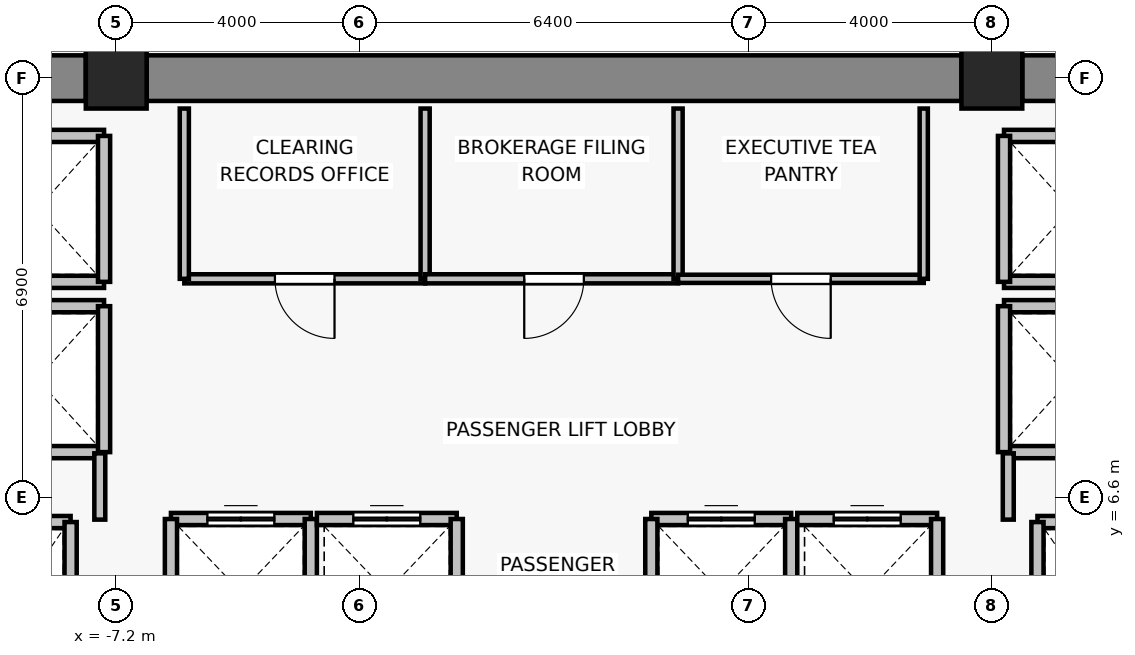
"""IFC4 building model, lengths in metres.
Left out: names, types, materials, properties, quantities, classifications, styles, units other than length and angle.
Written with IfcOpenShell. Run it as: python <this file> out.ifc"""

import sys

from ifc_helpers import new_model, si_unit, direction, frame, frame_2d, origin, origin_2d, place, context, subcontext, project, spatial, rectangle, extrude, source, transform, mapped, element, fill, save


model = new_model("IFC4")
c1 = context("Model", 3, precision=1e-05, world=origin(), true_north=direction((0.0, 1.0)))
c2 = subcontext(c1, "Body", "Model", "MODEL_VIEW")
j1 = project(units=[si_unit("LENGTHUNIT", "METRE"), si_unit("PLANEANGLEUNIT", "RADIAN")], contexts=[c1])
p1 = place(None, origin())
s1 = spatial("IfcSite", under=j1, at=p1, CompositionType="ELEMENT")
p2 = place(p1, origin())
s2 = spatial("IfcBuilding", under=s1, at=p2, CompositionType="ELEMENT")
p3 = place(p2, frame((0.0, 0.0, 116.5)))
s3 = spatial("IfcBuildingStorey", under=s2, at=p3, CompositionType="ELEMENT", Elevation=116.5)
for number, where, z_axis, x_axis in (
    (1, (-7.2, 13.5, 0.0), (0.0, 0.0, 1.0), (1.0, 0.0, 0.0)),
    (2, (7.2, 13.5, 0.0), (0.0, 0.0, 1.0), (1.0, 0.0, 0.0)),
):
    element("IfcColumn", number, at=place(p3, frame(where, z_axis=z_axis, x_axis=x_axis)), inside=s3, PredefinedType="COLUMN", context=c2, shape_type="SweptSolid", body=[
        extrude(rectangle(XDim=1.0, YDim=1.0, at=origin_2d()), origin(), (0.0, 0.0, 1.0), 3.3),
    ])
p4 = place(p3, frame((-13.9, 13.5, 0.0), z_axis=(0.0, 0.0, 1.0), x_axis=(1.0, 0.0, 0.0)))
e3 = element("IfcWall", 3, at=p4, inside=s3, PredefinedType="SHEAR", context=c2, shape_type="SweptSolid", body=[
    extrude(rectangle(XDim=6.2, YDim=0.75, at=frame_2d((3.1, 0.0))), origin(), (0.0, 0.0, 1.0), 3.075),
])
p5 = place(p3, frame((-6.7, 13.5, 0.0), z_axis=(0.0, 0.0, 1.0), x_axis=(1.0, 0.0, 0.0)))
e4 = element("IfcWall", 4, at=p5, inside=s3, PredefinedType="SHEAR", context=c2, shape_type="SweptSolid", body=[
    extrude(rectangle(XDim=13.4, YDim=0.75, at=frame_2d((6.7, 0.0))), origin(), (0.0, 0.0, 1.0), 3.075),
])
p6 = place(p3, frame((7.7, 13.5, 0.0), z_axis=(0.0, 0.0, 1.0), x_axis=(1.0, 0.0, 0.0)))
e5 = element("IfcWall", 5, at=p6, inside=s3, PredefinedType="SHEAR", context=c2, shape_type="SweptSolid", body=[
    extrude(rectangle(XDim=6.2, YDim=0.75, at=frame_2d((3.1, 0.0))), origin(), (0.0, 0.0, 1.0), 3.075),
])
p7 = place(p3, frame((-9.95, 6.2, 0.0), z_axis=(0.0, 0.0, 1.0), x_axis=(1.0, 0.0, 0.0)))
e6 = element("IfcWall", 6, at=p7, inside=s3, PredefinedType="SOLIDWALL", context=c2, shape_type="SweptSolid", body=[
    extrude(rectangle(XDim=2.0, YDim=0.2, at=frame_2d((1.0, 0.0))), origin(), (0.0, 0.0, 1.0), 3.075),
])
p8 = place(p3, frame((-7.95, 6.2, 0.0), z_axis=(0.0, 0.0, 1.0), x_axis=(0.0, -1.0, 0.0)))
e7 = element("IfcWall", 7, at=p8, inside=s3, PredefinedType="SOLIDWALL", context=c2, shape_type="SweptSolid", body=[
    extrude(rectangle(XDim=2.8, YDim=0.2, at=frame_2d((1.4, 0.0))), origin(), (0.0, 0.0, 1.0), 3.075),
])
p9 = place(p3, frame((7.95, 6.2, 0.0), z_axis=(0.0, 0.0, 1.0), x_axis=(1.0, 0.0, 0.0)))
e8 = element("IfcWall", 8, at=p9, inside=s3, PredefinedType="SOLIDWALL", context=c2, shape_type="SweptSolid", body=[
    extrude(rectangle(XDim=2.0, YDim=0.2, at=frame_2d((1.0, 0.0))), origin(), (0.0, 0.0, 1.0), 3.075),
])
p10 = place(p3, frame((7.95, 3.4, 0.0), z_axis=(0.0, 0.0, 1.0), x_axis=(0.0, 1.0, 0.0)))
e9 = element("IfcWall", 9, at=p10, inside=s3, PredefinedType="SOLIDWALL", context=c2, shape_type="SweptSolid", body=[
    extrude(rectangle(XDim=2.8, YDim=0.2, at=frame_2d((1.4, 0.0))), origin(), (0.0, 0.0, 1.0), 3.075),
])
p11 = place(p3, frame((-6.3, 6.25, 0.0), z_axis=(0.0, 0.0, 1.0), x_axis=(1.0, 0.0, 0.0)))
e10 = element("IfcWall", 10, at=p11, inside=s3, PredefinedType="SOLIDWALL", context=c2, shape_type="SweptSolid", body=[
    extrude(rectangle(XDim=2.3, YDim=0.2, at=frame_2d((1.15, 0.0))), origin(), (0.0, 0.0, 1.0), 3.075),
])
p12 = place(p11, frame((0.6, 0.0, 0.0)))
e11 = element("IfcOpeningElement", 11, at=p12, cuts=e10, PredefinedType="OPENING", context=c2, shape_type="SweptSolid", body=[
    extrude(rectangle(XDim=1.1, YDim=2.2, at=frame_2d((0.55, 1.1))), frame((0.0, 0.11, 0.0), z_axis=(0.0, -1.0, 0.0), x_axis=(1.0, 0.0, 0.0)), (0.0, 0.0, 1.0), 0.22),
])
for number, where, z_axis, x_axis in (
    (12, (-6.3, 3.85, 0.0), (0.0, 0.0, 1.0), (0.0, 1.0, 0.0)),
    (13, (-4.0, 6.25, 0.0), (0.0, 0.0, 1.0), (0.0, -1.0, 0.0)),
):
    element("IfcWall", number, at=place(p3, frame(where, z_axis=z_axis, x_axis=x_axis)), inside=s3, PredefinedType="SOLIDWALL", context=c2, shape_type="SweptSolid", body=[
        extrude(rectangle(XDim=2.4, YDim=0.2, at=frame_2d((1.2, 0.0))), origin(), (0.0, 0.0, 1.0), 3.075),
    ])
p13 = place(p3, frame((-3.9, 6.25, 0.0), z_axis=(0.0, 0.0, 1.0), x_axis=(1.0, 0.0, 0.0)))
e14 = element("IfcWall", 14, at=p13, inside=s3, PredefinedType="SOLIDWALL", context=c2, shape_type="SweptSolid", body=[
    extrude(rectangle(XDim=2.3, YDim=0.2, at=frame_2d((1.15, 0.0))), origin(), (0.0, 0.0, 1.0), 3.075),
])
p14 = place(p13, frame((0.6, 0.0, 0.0)))
e15 = element("IfcOpeningElement", 15, at=p14, cuts=e14, PredefinedType="OPENING", context=c2, shape_type="SweptSolid", body=[
    extrude(rectangle(XDim=1.1, YDim=2.2, at=frame_2d((0.55, 1.1))), frame((0.0, 0.11, 0.0), z_axis=(0.0, -1.0, 0.0), x_axis=(1.0, 0.0, 0.0)), (0.0, 0.0, 1.0), 0.22),
])
p15 = place(p3, frame((-1.6, 6.25, 0.0), z_axis=(0.0, 0.0, 1.0), x_axis=(0.0, -1.0, 0.0)))
e16 = element("IfcWall", 16, at=p15, inside=s3, PredefinedType="SOLIDWALL", context=c2, shape_type="SweptSolid", body=[
    extrude(rectangle(XDim=2.4, YDim=0.2, at=frame_2d((1.2, 0.0))), origin(), (0.0, 0.0, 1.0), 3.075),
])
p16 = place(p3, frame((1.6, 6.25, 0.0), z_axis=(0.0, 0.0, 1.0), x_axis=(1.0, 0.0, 0.0)))
e17 = element("IfcWall", 17, at=p16, inside=s3, PredefinedType="SOLIDWALL", context=c2, shape_type="SweptSolid", body=[
    extrude(rectangle(XDim=2.3, YDim=0.2, at=frame_2d((1.15, 0.0))), origin(), (0.0, 0.0, 1.0), 3.075),
])
p17 = place(p16, frame((0.6, 0.0, 0.0)))
e18 = element("IfcOpeningElement", 18, at=p17, cuts=e17, PredefinedType="OPENING", context=c2, shape_type="SweptSolid", body=[
    extrude(rectangle(XDim=1.1, YDim=2.2, at=frame_2d((0.55, 1.1))), frame((0.0, 0.11, 0.0), z_axis=(0.0, -1.0, 0.0), x_axis=(1.0, 0.0, 0.0)), (0.0, 0.0, 1.0), 0.22),
])
for number, where, z_axis, x_axis in (
    (19, (1.6, 3.85, 0.0), (0.0, 0.0, 1.0), (0.0, 1.0, 0.0)),
    (20, (3.9, 6.25, 0.0), (0.0, 0.0, 1.0), (0.0, -1.0, 0.0)),
):
    element("IfcWall", number, at=place(p3, frame(where, z_axis=z_axis, x_axis=x_axis)), inside=s3, PredefinedType="SOLIDWALL", context=c2, shape_type="SweptSolid", body=[
        extrude(rectangle(XDim=2.4, YDim=0.2, at=frame_2d((1.2, 0.0))), origin(), (0.0, 0.0, 1.0), 3.075),
    ])
p18 = place(p3, frame((4.0, 6.25, 0.0), z_axis=(0.0, 0.0, 1.0), x_axis=(1.0, 0.0, 0.0)))
e21 = element("IfcWall", 21, at=p18, inside=s3, PredefinedType="SOLIDWALL", context=c2, shape_type="SweptSolid", body=[
    extrude(rectangle(XDim=2.3, YDim=0.2, at=frame_2d((1.15, 0.0))), origin(), (0.0, 0.0, 1.0), 3.075),
])
p19 = place(p18, frame((0.6, 0.0, 0.0)))
e22 = element("IfcOpeningElement", 22, at=p19, cuts=e21, PredefinedType="OPENING", context=c2, shape_type="SweptSolid", body=[
    extrude(rectangle(XDim=1.1, YDim=2.2, at=frame_2d((0.55, 1.1))), frame((0.0, 0.11, 0.0), z_axis=(0.0, -1.0, 0.0), x_axis=(1.0, 0.0, 0.0)), (0.0, 0.0, 1.0), 0.22),
])
p20 = place(p3, frame((6.3, 6.25, 0.0), z_axis=(0.0, 0.0, 1.0), x_axis=(0.0, -1.0, 0.0)))
e23 = element("IfcWall", 23, at=p20, inside=s3, PredefinedType="SOLIDWALL", context=c2, shape_type="SweptSolid", body=[
    extrude(rectangle(XDim=2.4, YDim=0.2, at=frame_2d((1.2, 0.0))), origin(), (0.0, 0.0, 1.0), 3.075),
])
for number, where, z_axis, x_axis in (
    (24, (-7.4, 7.35, 0.0), (0.0, 0.0, 1.0), (-1.0, 0.0, 0.0)),
    (25, (-9.6, 9.75, 0.0), (0.0, 0.0, 1.0), (1.0, 0.0, 0.0)),
):
    element("IfcWall", number, at=place(p3, frame(where, z_axis=z_axis, x_axis=x_axis)), inside=s3, PredefinedType="SOLIDWALL", context=c2, shape_type="SweptSolid", body=[
        extrude(rectangle(XDim=2.2, YDim=0.2, at=frame_2d((1.1, 0.0))), origin(), (0.0, 0.0, 1.0), 2.515),
    ])
p21 = place(p3, frame((-7.4, 9.75, 0.0), z_axis=(0.0, 0.0, 1.0), x_axis=(0.0, -1.0, 0.0)))
e26 = element("IfcWall", 26, at=p21, inside=s3, PredefinedType="SOLIDWALL", context=c2, shape_type="SweptSolid", body=[
    extrude(rectangle(XDim=2.4, YDim=0.2, at=frame_2d((1.2, 0.0))), origin(), (0.0, 0.0, 1.0), 2.515),
])
for number, where, z_axis, x_axis in (
    (27, (-7.4, 10.15, 0.0), (0.0, 0.0, 1.0), (-1.0, 0.0, 0.0)),
    (28, (-9.6, 12.55, 0.0), (0.0, 0.0, 1.0), (1.0, 0.0, 0.0)),
):
    element("IfcWall", number, at=place(p3, frame(where, z_axis=z_axis, x_axis=x_axis)), inside=s3, PredefinedType="SOLIDWALL", context=c2, shape_type="SweptSolid", body=[
        extrude(rectangle(XDim=2.2, YDim=0.2, at=frame_2d((1.1, 0.0))), origin(), (0.0, 0.0, 1.0), 2.515),
    ])
p22 = place(p3, frame((-7.4, 12.55, 0.0), z_axis=(0.0, 0.0, 1.0), x_axis=(0.0, -1.0, 0.0)))
e29 = element("IfcWall", 29, at=p22, inside=s3, PredefinedType="SOLIDWALL", context=c2, shape_type="SweptSolid", body=[
    extrude(rectangle(XDim=2.4, YDim=0.2, at=frame_2d((1.2, 0.0))), origin(), (0.0, 0.0, 1.0), 2.515),
])
for number, where, z_axis, x_axis in (
    (30, (9.6, 7.35, 0.0), (0.0, 0.0, 1.0), (-1.0, 0.0, 0.0)),
    (31, (7.4, 9.75, 0.0), (0.0, 0.0, 1.0), (1.0, 0.0, 0.0)),
):
    element("IfcWall", number, at=place(p3, frame(where, z_axis=z_axis, x_axis=x_axis)), inside=s3, PredefinedType="SOLIDWALL", context=c2, shape_type="SweptSolid", body=[
        extrude(rectangle(XDim=2.2, YDim=0.2, at=frame_2d((1.1, 0.0))), origin(), (0.0, 0.0, 1.0), 2.515),
    ])
p23 = place(p3, frame((7.4, 7.35, 0.0), z_axis=(0.0, 0.0, 1.0), x_axis=(0.0, 1.0, 0.0)))
e32 = element("IfcWall", 32, at=p23, inside=s3, PredefinedType="SOLIDWALL", context=c2, shape_type="SweptSolid", body=[
    extrude(rectangle(XDim=2.4, YDim=0.2, at=frame_2d((1.2, 0.0))), origin(), (0.0, 0.0, 1.0), 2.515),
])
for number, where, z_axis, x_axis in (
    (33, (9.6, 10.15, 0.0), (0.0, 0.0, 1.0), (-1.0, 0.0, 0.0)),
    (34, (7.4, 12.55, 0.0), (0.0, 0.0, 1.0), (1.0, 0.0, 0.0)),
):
    element("IfcWall", number, at=place(p3, frame(where, z_axis=z_axis, x_axis=x_axis)), inside=s3, PredefinedType="SOLIDWALL", context=c2, shape_type="SweptSolid", body=[
        extrude(rectangle(XDim=2.2, YDim=0.2, at=frame_2d((1.1, 0.0))), origin(), (0.0, 0.0, 1.0), 2.515),
    ])
p24 = place(p3, frame((7.4, 10.15, 0.0), z_axis=(0.0, 0.0, 1.0), x_axis=(0.0, 1.0, 0.0)))
e35 = element("IfcWall", 35, at=p24, inside=s3, PredefinedType="SOLIDWALL", context=c2, shape_type="SweptSolid", body=[
    extrude(rectangle(XDim=2.4, YDim=0.2, at=frame_2d((1.2, 0.0))), origin(), (0.0, 0.0, 1.0), 2.515),
])
for number, where, z_axis, x_axis in (
    (36, (-7.47, 7.33, 0.0), (0.0, 0.0, 1.0), (0.0, -1.0, 0.0)),
    (37, (7.47, 6.24, 0.0), (0.0, 0.0, 1.0), (0.0, 1.0, 0.0)),
):
    element("IfcWall", number, at=place(p3, frame(where, z_axis=z_axis, x_axis=x_axis)), inside=s3, PredefinedType="PARTITIONING", context=c2, shape_type="SweptSolid", body=[
        extrude(rectangle(XDim=1.09, YDim=0.18, at=frame_2d((0.545, 0.0))), origin(), (0.0, 0.0, 1.0), 2.515),
    ])
p25 = place(p3, frame((-2.12, 10.2, 0.0), z_axis=(0.0, 0.0, 1.0), x_axis=(-1.0, 0.0, 0.0)))
e38 = element("IfcWall", 38, at=p25, inside=s3, PredefinedType="PARTITIONING", context=c2, shape_type="SweptSolid", body=[
    extrude(rectangle(XDim=3.96, YDim=0.15, at=frame_2d((1.98, 0.0))), origin(), (0.0, 0.0, 1.0), 3.075),
])
p26 = place(p25, frame((1.49, 0.0, 0.0)))
e39 = element("IfcOpeningElement", 39, at=p26, cuts=e38, PredefinedType="OPENING", context=c2, shape_type="SweptSolid", body=[
    extrude(rectangle(XDim=0.98, YDim=2.15, at=frame_2d((0.49, 1.075))), frame((0.0, 0.085, 0.0), z_axis=(0.0, -1.0, 0.0), x_axis=(1.0, 0.0, 0.0)), (0.0, 0.0, 1.0), 0.17),
])
for number, where, z_axis, x_axis in (
    (40, (-6.08, 10.2, 0.0), (0.0, 0.0, 1.0), (0.0, 1.0, 0.0)),
    (41, (-2.12, 13.0, 0.0), (0.0, 0.0, 1.0), (0.0, -1.0, 0.0)),
):
    element("IfcWall", number, at=place(p3, frame(where, z_axis=z_axis, x_axis=x_axis)), inside=s3, PredefinedType="PARTITIONING", context=c2, shape_type="SweptSolid", body=[
        extrude(rectangle(XDim=2.8, YDim=0.15, at=frame_2d((1.4, 0.0))), origin(), (0.0, 0.0, 1.0), 3.075),
    ])
p27 = place(p3, frame((2.04, 10.2, 0.0), z_axis=(0.0, 0.0, 1.0), x_axis=(-1.0, 0.0, 0.0)))
e42 = element("IfcWall", 42, at=p27, inside=s3, PredefinedType="PARTITIONING", context=c2, shape_type="SweptSolid", body=[
    extrude(rectangle(XDim=4.16, YDim=0.15, at=frame_2d((2.08, 0.0))), origin(), (0.0, 0.0, 1.0), 3.075),
])
p28 = place(p27, frame((1.55, 0.0, 0.0)))
e43 = element("IfcOpeningElement", 43, at=p28, cuts=e42, PredefinedType="OPENING", context=c2, shape_type="SweptSolid", body=[
    extrude(rectangle(XDim=0.98, YDim=2.15, at=frame_2d((0.49, 1.075))), frame((0.0, 0.085, 0.0), z_axis=(0.0, -1.0, 0.0), x_axis=(1.0, 0.0, 0.0)), (0.0, 0.0, 1.0), 0.17),
])
p29 = place(p3, frame((2.04, 13.0, 0.0), z_axis=(0.0, 0.0, 1.0), x_axis=(0.0, -1.0, 0.0)))
e44 = element("IfcWall", 44, at=p29, inside=s3, PredefinedType="PARTITIONING", context=c2, shape_type="SweptSolid", body=[
    extrude(rectangle(XDim=2.8, YDim=0.15, at=frame_2d((1.4, 0.0))), origin(), (0.0, 0.0, 1.0), 3.075),
])
p30 = place(p3, frame((6.08, 10.2, 0.0), z_axis=(0.0, 0.0, 1.0), x_axis=(-1.0, 0.0, 0.0)))
e45 = element("IfcWall", 45, at=p30, inside=s3, PredefinedType="PARTITIONING", context=c2, shape_type="SweptSolid", body=[
    extrude(rectangle(XDim=4.04, YDim=0.135, at=frame_2d((2.02, 0.0))), origin(), (0.0, 0.0, 1.0), 3.075),
])
p31 = place(p30, frame((1.53, 0.0, 0.0)))
e46 = element("IfcOpeningElement", 46, at=p31, cuts=e45, PredefinedType="OPENING", context=c2, shape_type="SweptSolid", body=[
    extrude(rectangle(XDim=0.98, YDim=2.15, at=frame_2d((0.49, 1.075))), frame((0.0, 0.077, 0.0), z_axis=(0.0, -1.0, 0.0), x_axis=(1.0, 0.0, 0.0)), (0.0, 0.0, 1.0), 0.155),
])
p32 = place(p3, frame((6.08, 13.0, 0.0), z_axis=(0.0, 0.0, 1.0), x_axis=(0.0, -1.0, 0.0)))
e47 = element("IfcWall", 47, at=p32, inside=s3, PredefinedType="PARTITIONING", context=c2, shape_type="SweptSolid", body=[
    extrude(rectangle(XDim=2.8, YDim=0.135, at=frame_2d((1.4, 0.0))), origin(), (0.0, 0.0, 1.0), 3.075),
])
m1 = source(origin(), c2, "Body", "SweptSolid", [
    extrude(rectangle(XDim=1.1, YDim=2.2, at=frame_2d((0.55, 1.1))), frame((0.0, 0.025, 0.0), z_axis=(0.0, -1.0, 0.0), x_axis=(1.0, 0.0, 0.0)), (0.0, 0.0, 1.0), 0.05),
])
p33 = place(p12, origin())
e48 = element("IfcDoor", 48, at=p33, inside=s3, OperationType="DOUBLE_DOOR_SLIDING", PredefinedType="DOOR", context=c2, shape_type="MappedRepresentation", body=[
    mapped(m1, transform((0.0, 0.0, 0.0), x_axis=(1.0, 0.0, 0.0), y_axis=(0.0, 1.0, 0.0), z_axis=(0.0, 0.0, 1.0), scale=1.0)),
])
fill(e11, e48)
p34 = place(p14, origin())
e49 = element("IfcDoor", 49, at=p34, inside=s3, OperationType="DOUBLE_DOOR_SLIDING", PredefinedType="DOOR", context=c2, shape_type="MappedRepresentation", body=[
    mapped(m1, transform((0.0, 0.0, 0.0), x_axis=(1.0, 0.0, 0.0), y_axis=(0.0, 1.0, 0.0), z_axis=(0.0, 0.0, 1.0), scale=1.0)),
])
fill(e15, e49)
p35 = place(p17, origin())
e50 = element("IfcDoor", 50, at=p35, inside=s3, OperationType="DOUBLE_DOOR_SLIDING", PredefinedType="DOOR", context=c2, shape_type="MappedRepresentation", body=[
    mapped(m1, transform((0.0, 0.0, 0.0), x_axis=(1.0, 0.0, 0.0), y_axis=(0.0, 1.0, 0.0), z_axis=(0.0, 0.0, 1.0), scale=1.0)),
])
fill(e18, e50)
p36 = place(p19, origin())
e51 = element("IfcDoor", 51, at=p36, inside=s3, OperationType="DOUBLE_DOOR_SLIDING", PredefinedType="DOOR", context=c2, shape_type="MappedRepresentation", body=[
    mapped(m1, transform((0.0, 0.0, 0.0), x_axis=(1.0, 0.0, 0.0), y_axis=(0.0, 1.0, 0.0), z_axis=(0.0, 0.0, 1.0), scale=1.0)),
])
fill(e22, e51)
m2 = source(origin(), c2, "Body", "SweptSolid", [
    extrude(rectangle(XDim=0.98, YDim=2.15, at=frame_2d((0.49, 1.075))), frame((0.0, 0.025, 0.0), z_axis=(0.0, -1.0, 0.0), x_axis=(1.0, 0.0, 0.0)), (0.0, 0.0, 1.0), 0.05),
])
p37 = place(p26, origin())
e52 = element("IfcDoor", 52, at=p37, inside=s3, OperationType="SINGLE_SWING_LEFT", PredefinedType="DOOR", context=c2, shape_type="MappedRepresentation", body=[
    mapped(m2, transform((0.0, 0.0, 0.0), x_axis=(1.0, 0.0, 0.0), y_axis=(0.0, 1.0, 0.0), z_axis=(0.0, 0.0, 1.0), scale=1.0)),
])
fill(e39, e52)
p38 = place(p28, origin())
e53 = element("IfcDoor", 53, at=p38, inside=s3, OperationType="SINGLE_SWING_RIGHT", PredefinedType="DOOR", context=c2, shape_type="MappedRepresentation", body=[
    mapped(m2, transform((0.0, 0.0, 0.0), x_axis=(1.0, 0.0, 0.0), y_axis=(0.0, 1.0, 0.0), z_axis=(0.0, 0.0, 1.0), scale=1.0)),
])
fill(e43, e53)
p39 = place(p31, origin())
e54 = element("IfcDoor", 54, at=p39, inside=s3, OperationType="SINGLE_SWING_LEFT", PredefinedType="DOOR", context=c2, shape_type="MappedRepresentation", body=[
    mapped(m2, transform((0.0, 0.0, 0.0), x_axis=(1.0, 0.0, 0.0), y_axis=(0.0, 1.0, 0.0), z_axis=(0.0, 0.0, 1.0), scale=1.0)),
])
fill(e46, e54)
save(model, sys.argv[1])
